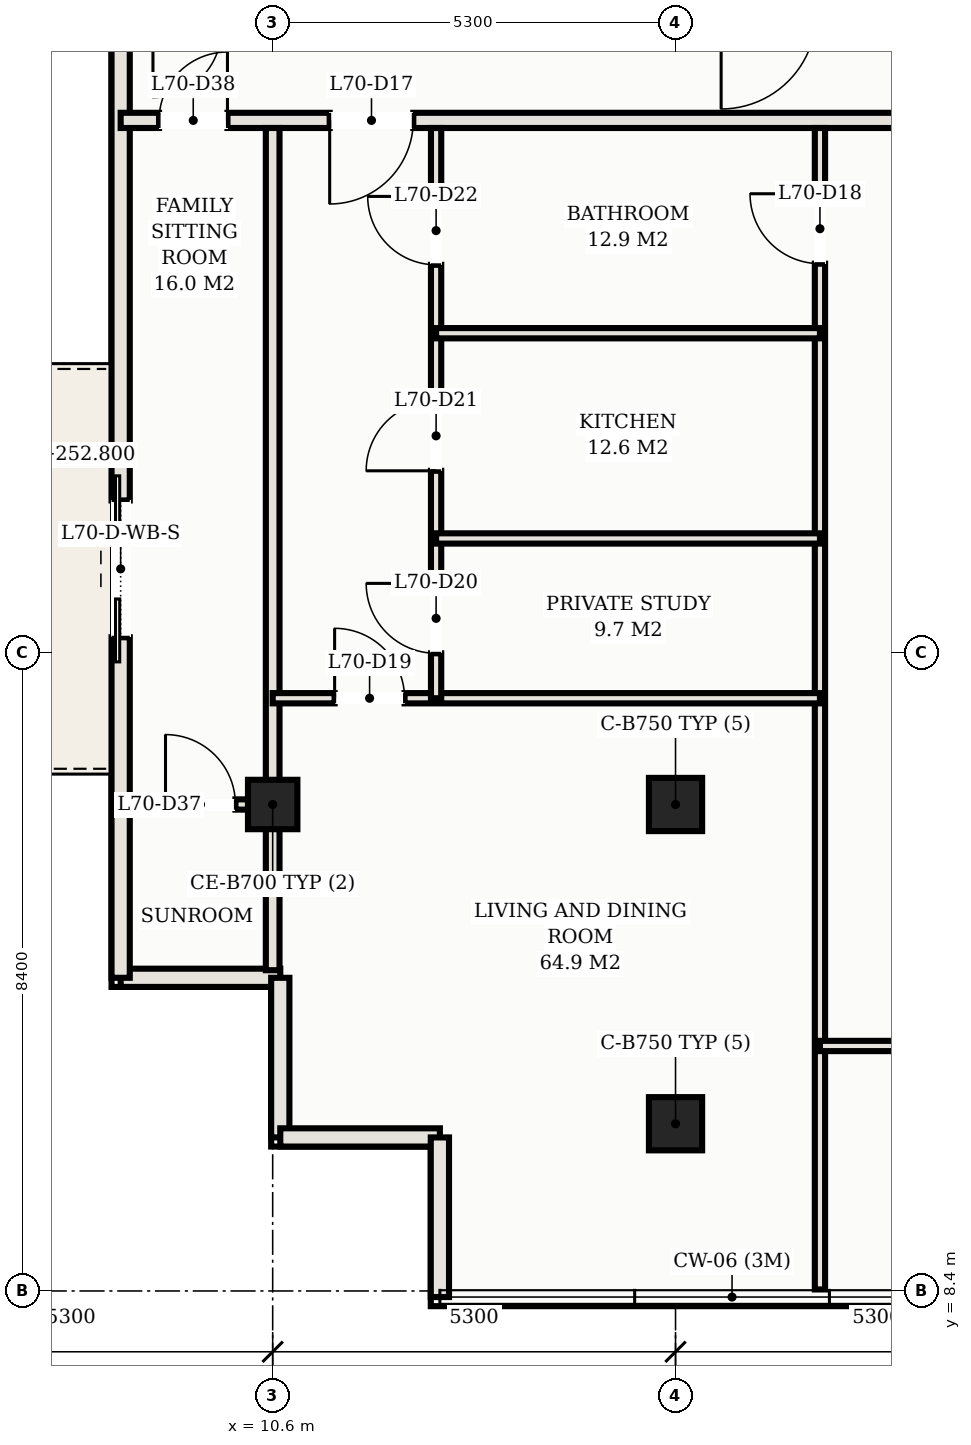
"""IFC4 building model, lengths in metres.
Left out: names, types, materials, properties, quantities, classifications, styles, units other than length and angle.
Written with IfcOpenShell. Run it as: python <this file> out.ifc"""

import sys

from ifc_helpers import new_model, si_unit, direction, frame, frame_2d, origin, origin_2d, place, context, subcontext, project, spatial, rectangle, hollow_rectangle, extrude, element, fill, save


model = new_model("IFC4")
c1 = context("Model", 3, precision=1e-05, world=origin(), true_north=direction((0.0, 1.0)))
c2 = subcontext(c1, "Body", "Model", "MODEL_VIEW")
j1 = project(units=[si_unit("LENGTHUNIT", "METRE"), si_unit("PLANEANGLEUNIT", "RADIAN")], contexts=[c1])
p1 = place(None, origin())
s1 = spatial("IfcSite", under=j1, at=p1, CompositionType="ELEMENT")
p2 = place(p1, origin())
s2 = spatial("IfcBuilding", under=s1, at=p2, CompositionType="ELEMENT")
p3 = place(p2, frame((0.0, 0.0, 252.8)))
s3 = spatial("IfcBuildingStorey", under=s2, at=p3, CompositionType="ELEMENT", Elevation=252.8)
for number, where, z_axis, x_axis in (
    (1, (15.9, 14.8, 0.0), (0.0, 0.0, 1.0), (1.0, 0.0, 0.0)),
    (2, (15.9, 10.6, 0.0), (0.0, 0.0, 1.0), (1.0, 0.0, 0.0)),
):
    element("IfcColumn", number, at=place(p3, frame(where, z_axis=z_axis, x_axis=x_axis)), inside=s3, PredefinedType="COLUMN", context=c2, shape_type="SweptSolid", body=[
        extrude(hollow_rectangle(XDim=0.7, YDim=0.7, WallThickness=0.025, at=origin_2d()), origin(), (0.0, 0.0, 1.0), 3.3),
    ])
p4 = place(p3, frame((10.6, 14.8, 0.0), z_axis=(0.0, 0.0, 1.0), x_axis=(1.0, 0.0, 0.0)))
e3 = element("IfcColumn", 3, at=p4, inside=s3, PredefinedType="COLUMN", context=c2, shape_type="SweptSolid", body=[
    extrude(hollow_rectangle(XDim=0.65, YDim=0.65, WallThickness=0.022, at=origin_2d()), origin(), (0.0, 0.0, 1.0), 3.3),
])
p5 = place(p3, frame((8.6, 12.52, 0.0), z_axis=(0.0, 0.0, 1.0), x_axis=(1.0, 0.0, 0.0)))
e4 = element("IfcWall", 4, at=p5, inside=s3, PredefinedType="SOLIDWALL", context=c2, shape_type="SweptSolid", body=[
    extrude(rectangle(XDim=2.1, YDim=0.24, at=frame_2d((1.05, 0.0))), origin(), (0.0, 0.0, 1.0), 3.11),
])
for number, where, z_axis, x_axis in (
    (5, (10.7, 12.52, 0.0), (0.0, 0.0, 1.0), (0.0, -1.0, 0.0)),
    (6, (10.7, 10.42, 0.0), (0.0, 0.0, 1.0), (1.0, 0.0, 0.0)),
):
    element("IfcWall", number, at=place(p3, frame(where, z_axis=z_axis, x_axis=x_axis)), inside=s3, PredefinedType="SOLIDWALL", context=c2, shape_type="SweptSolid", body=[
        extrude(rectangle(XDim=2.1, YDim=0.24, at=frame_2d((1.05, 0.0))), origin(), (0.0, 0.0, 1.0), 3.11),
    ])
p6 = place(p3, frame((12.8, 10.42, 0.0), z_axis=(0.0, 0.0, 1.0), x_axis=(0.0, -1.0, 0.0)))
e7 = element("IfcWall", 7, at=p6, inside=s3, PredefinedType="SOLIDWALL", context=c2, shape_type="SweptSolid", body=[
    extrude(rectangle(XDim=2.1, YDim=0.24, at=frame_2d((1.05, 0.0))), origin(), (0.0, 0.0, 1.0), 3.11),
])
p7 = place(p3, frame((8.6, 38.53, 0.0), z_axis=(0.0, 0.0, 1.0), x_axis=(0.0, -1.0, 0.0)))
e8 = element("IfcWall", 8, at=p7, inside=s3, PredefinedType="SOLIDWALL", context=c2, shape_type="SweptSolid", body=[
    extrude(rectangle(XDim=26.01, YDim=0.24, at=frame_2d((13.005, 0.0))), origin(), (0.0, 0.0, 1.0), 3.11),
])
p8 = place(p7, frame((19.73, 0.0, 0.0)))
e9 = element("IfcOpeningElement", 9, at=p8, cuts=e8, PredefinedType="OPENING", context=c2, shape_type="SweptSolid", body=[
    extrude(rectangle(XDim=1.8, YDim=2.2, at=frame_2d((0.9, 1.1))), frame((0.0, 0.13, 0.0), z_axis=(0.0, -1.0, 0.0), x_axis=(1.0, 0.0, 0.0)), (0.0, 0.0, 1.0), 0.26),
])
p9 = place(p7, frame((0.45, 0.0, 0.75)))
e10 = element("IfcOpeningElement", 10, at=p9, cuts=e8, PredefinedType="OPENING", context=c2, shape_type="SweptSolid", body=[
    extrude(rectangle(XDim=2.1, YDim=1.65, at=frame_2d((1.05, 0.825))), frame((0.0, 0.13, 0.0), z_axis=(0.0, -1.0, 0.0), x_axis=(1.0, 0.0, 0.0)), (0.0, 0.0, 1.0), 0.26),
])
p10 = place(p3, frame((8.6, 23.8, 0.0), z_axis=(0.0, 0.0, 1.0), x_axis=(1.0, 0.0, 0.0)))
e11 = element("IfcWall", 11, at=p10, inside=s3, PredefinedType="PARTITIONING", context=c2, shape_type="SweptSolid", body=[
    extrude(rectangle(XDim=35.8, YDim=0.2, at=frame_2d((17.9, 0.0))), origin(), (0.0, 0.0, 1.0), 2.45),
])
p11 = place(p10, frame((2.75, 0.0, 0.0)))
e12 = element("IfcOpeningElement", 12, at=p11, cuts=e11, PredefinedType="OPENING", context=c2, shape_type="SweptSolid", body=[
    extrude(rectangle(XDim=1.1, YDim=2.25, at=frame_2d((0.55, 1.125))), frame((0.0, 0.11, 0.0), z_axis=(0.0, -1.0, 0.0), x_axis=(1.0, 0.0, 0.0)), (0.0, 0.0, 1.0), 0.22),
])
p12 = place(p10, frame((18.85, 0.0, 0.0)))
e13 = element("IfcOpeningElement", 13, at=p12, cuts=e11, PredefinedType="OPENING", context=c2, shape_type="SweptSolid", body=[
    extrude(rectangle(XDim=1.1, YDim=2.25, at=frame_2d((0.55, 1.125))), frame((0.0, 0.11, 0.0), z_axis=(0.0, -1.0, 0.0), x_axis=(1.0, 0.0, 0.0)), (0.0, 0.0, 1.0), 0.22),
])
p13 = place(p10, frame((0.505, 0.0, 0.0)))
e14 = element("IfcOpeningElement", 14, at=p13, cuts=e11, PredefinedType="OPENING", context=c2, shape_type="SweptSolid", body=[
    extrude(rectangle(XDim=0.9, YDim=2.15, at=frame_2d((0.45, 1.075))), frame((0.0, 0.11, 0.0), z_axis=(0.0, -1.0, 0.0), x_axis=(1.0, 0.0, 0.0)), (0.0, 0.0, 1.0), 0.22),
])
p14 = place(p10, frame((34.395, 0.0, 0.0)))
e15 = element("IfcOpeningElement", 15, at=p14, cuts=e11, PredefinedType="OPENING", context=c2, shape_type="SweptSolid", body=[
    extrude(rectangle(XDim=0.9, YDim=2.15, at=frame_2d((0.45, 1.075))), frame((0.0, 0.11, 0.0), z_axis=(0.0, -1.0, 0.0), x_axis=(1.0, 0.0, 0.0)), (0.0, 0.0, 1.0), 0.22),
])
p15 = place(p3, frame((10.6, 12.62, 0.0), z_axis=(0.0, 0.0, 1.0), x_axis=(0.0, 1.0, 0.0)))
e16 = element("IfcWall", 16, at=p15, inside=s3, PredefinedType="PARTITIONING", context=c2, shape_type="SweptSolid", body=[
    extrude(rectangle(XDim=11.08, YDim=0.18, at=frame_2d((5.54, 0.0))), origin(), (0.0, 0.0, 1.0), 2.45),
])
p16 = place(p3, frame((17.8, 8.42, 0.0), z_axis=(0.0, 0.0, 1.0), x_axis=(0.0, 1.0, 0.0)))
e17 = element("IfcWall", 17, at=p16, inside=s3, PredefinedType="PARTITIONING", context=c2, shape_type="SweptSolid", body=[
    extrude(rectangle(XDim=15.28, YDim=0.135, at=frame_2d((7.64, 0.0))), origin(), (0.0, 0.0, 1.0), 2.45),
])
p17 = place(p16, frame((13.495, 0.0, 0.0)))
e18 = element("IfcOpeningElement", 18, at=p17, cuts=e17, PredefinedType="OPENING", context=c2, shape_type="SweptSolid", body=[
    extrude(rectangle(XDim=0.92, YDim=2.15, at=frame_2d((0.46, 1.075))), frame((0.0, 0.078, 0.0), z_axis=(0.0, -1.0, 0.0), x_axis=(1.0, 0.0, 0.0)), (0.0, 0.0, 1.0), 0.155),
])
p18 = place(p3, frame((10.6, 16.198, 0.0), z_axis=(0.0, 0.0, 1.0), x_axis=(1.0, 0.0, 0.0)))
e19 = element("IfcWall", 19, at=p18, inside=s3, PredefinedType="PARTITIONING", context=c2, shape_type="SweptSolid", body=[
    extrude(rectangle(XDim=7.2, YDim=0.135, at=frame_2d((3.6, 0.0))), origin(), (0.0, 0.0, 1.0), 2.45),
])
p19 = place(p18, frame((0.815, 0.0, 0.0)))
e20 = element("IfcOpeningElement", 20, at=p19, cuts=e19, PredefinedType="OPENING", context=c2, shape_type="SweptSolid", body=[
    extrude(rectangle(XDim=0.92, YDim=2.15, at=frame_2d((0.46, 1.075))), frame((0.0, 0.078, 0.0), z_axis=(0.0, -1.0, 0.0), x_axis=(1.0, 0.0, 0.0)), (0.0, 0.0, 1.0), 0.155),
])
p20 = place(p3, frame((12.75, 16.198, 0.0), z_axis=(0.0, 0.0, 1.0), x_axis=(0.0, 1.0, 0.0)))
e21 = element("IfcWall", 21, at=p20, inside=s3, PredefinedType="PARTITIONING", context=c2, shape_type="SweptSolid", body=[
    extrude(rectangle(XDim=7.502, YDim=0.135, at=frame_2d((3.751, 0.0))), origin(), (0.0, 0.0, 1.0), 2.45),
])
p21 = place(p20, frame((0.591, 0.0, 0.0)))
e22 = element("IfcOpeningElement", 22, at=p21, cuts=e21, PredefinedType="OPENING", context=c2, shape_type="SweptSolid", body=[
    extrude(rectangle(XDim=0.92, YDim=2.15, at=frame_2d((0.46, 1.075))), frame((0.0, 0.078, 0.0), z_axis=(0.0, -1.0, 0.0), x_axis=(1.0, 0.0, 0.0)), (0.0, 0.0, 1.0), 0.155),
])
p22 = place(p20, frame((2.992, 0.0, 0.0)))
e23 = element("IfcOpeningElement", 23, at=p22, cuts=e21, PredefinedType="OPENING", context=c2, shape_type="SweptSolid", body=[
    extrude(rectangle(XDim=0.92, YDim=2.15, at=frame_2d((0.46, 1.075))), frame((0.0, 0.078, 0.0), z_axis=(0.0, -1.0, 0.0), x_axis=(1.0, 0.0, 0.0)), (0.0, 0.0, 1.0), 0.155),
])
p23 = place(p20, frame((5.702, 0.0, 0.0)))
e24 = element("IfcOpeningElement", 24, at=p23, cuts=e21, PredefinedType="OPENING", context=c2, shape_type="SweptSolid", body=[
    extrude(rectangle(XDim=0.9, YDim=2.15, at=frame_2d((0.45, 1.075))), frame((0.0, 0.078, 0.0), z_axis=(0.0, -1.0, 0.0), x_axis=(1.0, 0.0, 0.0)), (0.0, 0.0, 1.0), 0.155),
])
for number, where, z_axis, x_axis in (
    (25, (12.75, 18.3, 0.0), (0.0, 0.0, 1.0), (1.0, 0.0, 0.0)),
    (26, (12.75, 21.0, 0.0), (0.0, 0.0, 1.0), (1.0, 0.0, 0.0)),
):
    element("IfcWall", number, at=place(p3, frame(where, z_axis=z_axis, x_axis=x_axis)), inside=s3, PredefinedType="PARTITIONING", context=c2, shape_type="SweptSolid", body=[
        extrude(rectangle(XDim=5.05, YDim=0.135, at=frame_2d((2.525, 0.0))), origin(), (0.0, 0.0, 1.0), 2.45),
    ])
p24 = place(p3, frame((17.8, 11.623, 0.0), z_axis=(0.0, 0.0, 1.0), x_axis=(1.0, 0.0, 0.0)))
e27 = element("IfcWall", 27, at=p24, inside=s3, PredefinedType="PARTITIONING", context=c2, shape_type="SweptSolid", body=[
    extrude(rectangle(XDim=8.7, YDim=0.135, at=frame_2d((4.35, 0.0))), origin(), (0.0, 0.0, 1.0), 2.45),
])
p25 = place(p24, frame((1.125, 0.0, 0.0)))
e28 = element("IfcOpeningElement", 28, at=p25, cuts=e27, PredefinedType="OPENING", context=c2, shape_type="SweptSolid", body=[
    extrude(rectangle(XDim=0.95, YDim=2.15, at=frame_2d((0.475, 1.075))), frame((0.0, 0.078, 0.0), z_axis=(0.0, -1.0, 0.0), x_axis=(1.0, 0.0, 0.0)), (0.0, 0.0, 1.0), 0.155),
])
p26 = place(p24, frame((6.45, 0.0, 0.0)))
e29 = element("IfcOpeningElement", 29, at=p26, cuts=e27, PredefinedType="OPENING", context=c2, shape_type="SweptSolid", body=[
    extrude(rectangle(XDim=0.9, YDim=2.15, at=frame_2d((0.45, 1.075))), frame((0.0, 0.078, 0.0), z_axis=(0.0, -1.0, 0.0), x_axis=(1.0, 0.0, 0.0)), (0.0, 0.0, 1.0), 0.155),
])
p27 = place(p3, frame((8.7, 14.8, 0.0), z_axis=(0.0, 0.0, 1.0), x_axis=(1.0, 0.0, 0.0)))
e30 = element("IfcWall", 30, at=p27, inside=s3, PredefinedType="PARTITIONING", context=c2, shape_type="SweptSolid", body=[
    extrude(rectangle(XDim=1.9, YDim=0.135, at=frame_2d((0.95, 0.0))), origin(), (0.0, 0.0, 1.0), 2.45),
])
p28 = place(p27, frame((0.49, 0.0, 0.0)))
e31 = element("IfcOpeningElement", 31, at=p28, cuts=e30, PredefinedType="OPENING", context=c2, shape_type="SweptSolid", body=[
    extrude(rectangle(XDim=0.92, YDim=2.15, at=frame_2d((0.46, 1.075))), frame((0.0, 0.078, 0.0), z_axis=(0.0, -1.0, 0.0), x_axis=(1.0, 0.0, 0.0)), (0.0, 0.0, 1.0), 0.155),
])
p29 = place(p8, frame((1.8, 0.0, 0.0), z_axis=(0.0, 0.0, 1.0), x_axis=(-1.0, 0.0, 0.0)))
e32 = element("IfcDoor", 32, at=p29, inside=s3, OperationType="DOUBLE_DOOR_SLIDING", PredefinedType="DOOR", context=c2, shape_type="SweptSolid", body=[
    extrude(rectangle(XDim=1.8, YDim=2.2, at=frame_2d((0.9, 1.1))), frame((0.0, 0.025, 0.0), z_axis=(0.0, -1.0, 0.0), x_axis=(1.0, 0.0, 0.0)), (0.0, 0.0, 1.0), 0.05),
])
fill(e9, e32)
p30 = place(p11, frame((1.1, 0.0, 0.0), z_axis=(0.0, 0.0, 1.0), x_axis=(-1.0, 0.0, 0.0)))
e33 = element("IfcDoor", 33, at=p30, inside=s3, OperationType="SINGLE_SWING_RIGHT", PredefinedType="DOOR", context=c2, shape_type="SweptSolid", body=[
    extrude(rectangle(XDim=1.1, YDim=2.25, at=frame_2d((0.55, 1.125))), frame((0.0, 0.025, 0.0), z_axis=(0.0, -1.0, 0.0), x_axis=(1.0, 0.0, 0.0)), (0.0, 0.0, 1.0), 0.05),
])
fill(e12, e33)
p31 = place(p17, origin())
e34 = element("IfcDoor", 34, at=p31, inside=s3, OperationType="SINGLE_SWING_RIGHT", PredefinedType="DOOR", context=c2, shape_type="SweptSolid", body=[
    extrude(rectangle(XDim=0.92, YDim=2.15, at=frame_2d((0.46, 1.075))), frame((0.0, 0.025, 0.0), z_axis=(0.0, -1.0, 0.0), x_axis=(1.0, 0.0, 0.0)), (0.0, 0.0, 1.0), 0.05),
])
fill(e18, e34)
p32 = place(p19, origin())
e35 = element("IfcDoor", 35, at=p32, inside=s3, OperationType="SINGLE_SWING_LEFT", PredefinedType="DOOR", context=c2, shape_type="SweptSolid", body=[
    extrude(rectangle(XDim=0.92, YDim=2.15, at=frame_2d((0.46, 1.075))), frame((0.0, 0.025, 0.0), z_axis=(0.0, -1.0, 0.0), x_axis=(1.0, 0.0, 0.0)), (0.0, 0.0, 1.0), 0.05),
])
fill(e20, e35)
p33 = place(p21, origin())
e36 = element("IfcDoor", 36, at=p33, inside=s3, OperationType="SINGLE_SWING_RIGHT", PredefinedType="DOOR", context=c2, shape_type="SweptSolid", body=[
    extrude(rectangle(XDim=0.92, YDim=2.15, at=frame_2d((0.46, 1.075))), frame((0.0, 0.025, 0.0), z_axis=(0.0, -1.0, 0.0), x_axis=(1.0, 0.0, 0.0)), (0.0, 0.0, 1.0), 0.05),
])
fill(e22, e36)
p34 = place(p22, origin())
e37 = element("IfcDoor", 37, at=p34, inside=s3, OperationType="SINGLE_SWING_LEFT", PredefinedType="DOOR", context=c2, shape_type="SweptSolid", body=[
    extrude(rectangle(XDim=0.92, YDim=2.15, at=frame_2d((0.46, 1.075))), frame((0.0, 0.025, 0.0), z_axis=(0.0, -1.0, 0.0), x_axis=(1.0, 0.0, 0.0)), (0.0, 0.0, 1.0), 0.05),
])
fill(e23, e37)
p35 = place(p23, origin())
e38 = element("IfcDoor", 38, at=p35, inside=s3, OperationType="SINGLE_SWING_RIGHT", PredefinedType="DOOR", context=c2, shape_type="SweptSolid", body=[
    extrude(rectangle(XDim=0.9, YDim=2.15, at=frame_2d((0.45, 1.075))), frame((0.0, 0.025, 0.0), z_axis=(0.0, -1.0, 0.0), x_axis=(1.0, 0.0, 0.0)), (0.0, 0.0, 1.0), 0.05),
])
fill(e24, e38)
p36 = place(p28, origin())
e39 = element("IfcDoor", 39, at=p36, inside=s3, OperationType="SINGLE_SWING_LEFT", PredefinedType="DOOR", context=c2, shape_type="SweptSolid", body=[
    extrude(rectangle(XDim=0.92, YDim=2.15, at=frame_2d((0.46, 1.075))), frame((0.0, 0.025, 0.0), z_axis=(0.0, -1.0, 0.0), x_axis=(1.0, 0.0, 0.0)), (0.0, 0.0, 1.0), 0.05),
])
fill(e31, e39)
p37 = place(p13, origin())
e40 = element("IfcDoor", 40, at=p37, inside=s3, OperationType="SINGLE_SWING_RIGHT", PredefinedType="DOOR", context=c2, shape_type="SweptSolid", body=[
    extrude(rectangle(XDim=0.9, YDim=2.15, at=frame_2d((0.45, 1.075))), frame((0.0, 0.025, 0.0), z_axis=(0.0, -1.0, 0.0), x_axis=(1.0, 0.0, 0.0)), (0.0, 0.0, 1.0), 0.05),
])
fill(e14, e40)
save(model, sys.argv[1])
